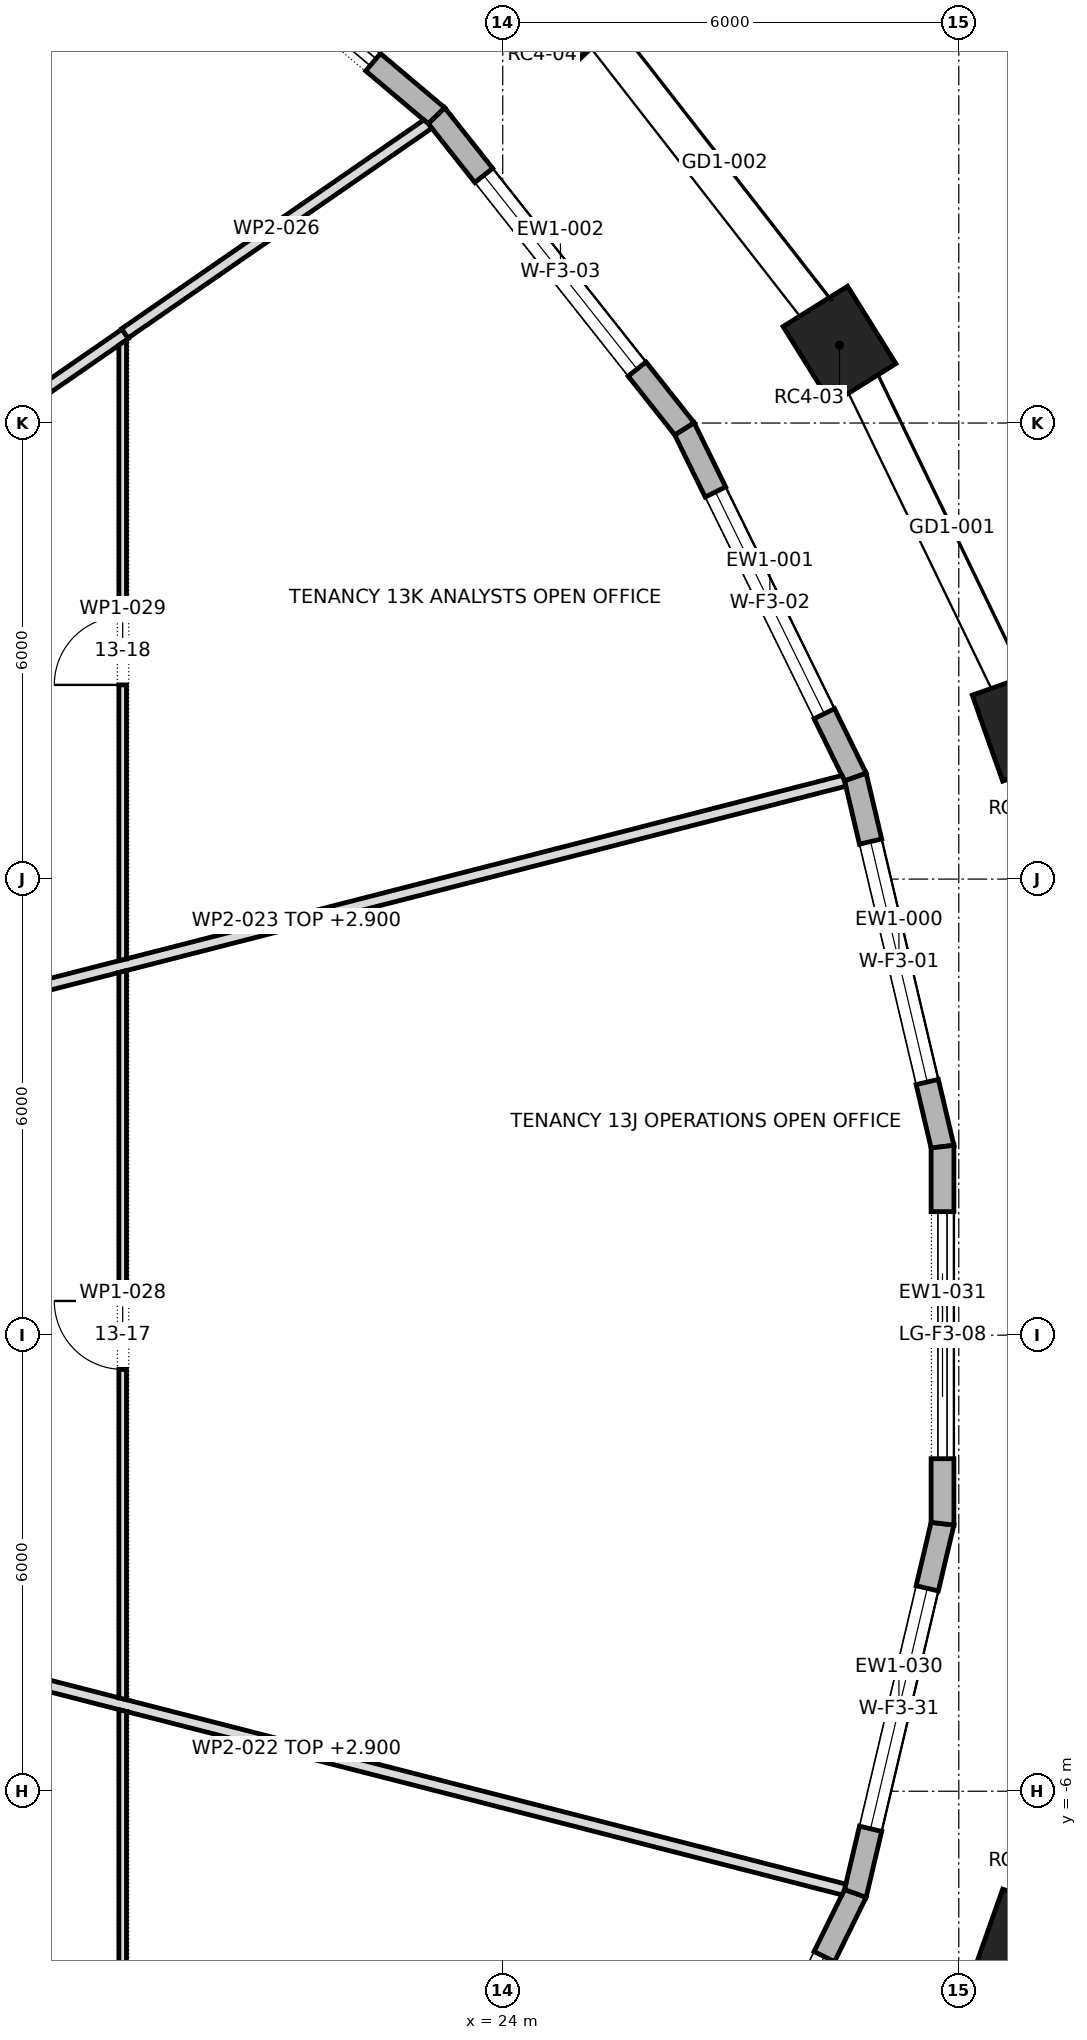
"""IFC4 building model, lengths in metres.
Left out: names, types, materials, properties, quantities, classifications, styles, units other than length and angle.
Written with IfcOpenShell. Run it as: python <this file> out.ifc"""

import sys

from ifc_helpers import new_model, si_unit, direction, frame, frame_2d, origin, origin_2d, place, context, subcontext, project, spatial, polyline, rectangle, outline, extrude, element, fill, save


model = new_model("IFC4")
c1 = context("Model", 3, precision=1e-05, world=origin(), true_north=direction((0.0, 1.0)))
c2 = subcontext(c1, "Body", "Model", "MODEL_VIEW")
j1 = project(units=[si_unit("LENGTHUNIT", "METRE"), si_unit("PLANEANGLEUNIT", "RADIAN")], contexts=[c1])
p1 = place(None, origin())
s1 = spatial("IfcSite", under=j1, at=p1, CompositionType="ELEMENT")
p2 = place(p1, origin())
s2 = spatial("IfcBuilding", under=s1, at=p2, CompositionType="ELEMENT")
p3 = place(p2, frame((0.0, 0.0, 198.9)))
s3 = spatial("IfcBuildingStorey", under=s2, at=p3, CompositionType="ELEMENT", Elevation=198.9)
for number, where, z_axis, x_axis in (
    (1, (30.849, 8.021, 0.0), (0.0, 0.0, 1.0), (-0.334, 0.943, 0.0)),
    (2, (28.43, 13.025, 0.0), (0.0, 0.0, 1.0), (-0.529, 0.849, 0.0)),
    (3, (24.919, 17.529, 0.0), (0.0, 0.0, 1.0), (-0.692, 0.722, 0.0)),
    (4, (30.849, -8.021, 0.0), (0.0, 0.0, 1.0), (0.334, 0.943, 0.0)),
):
    element("IfcColumn", number, at=place(p3, frame(where, z_axis=z_axis, x_axis=x_axis)), inside=s3, PredefinedType="COLUMN", context=c2, shape_type="SweptSolid", body=[
        extrude(rectangle(XDim=1.2, YDim=1.0, at=origin_2d()), origin(), (0.0, 0.0, 1.0), 4.0),
    ])
p4 = place(p3, frame((29.785, 2.48, 0.0), z_axis=(0.0, 0.0, 1.0), x_axis=(-0.229455912692, 0.97331905567, 0.0)))
e5 = element("IfcWall", 5, at=p4, inside=s3, PredefinedType="STANDARD", context=c2, shape_type="SweptSolid", body=[
    extrude(outline(polyline([(-0.017, -0.15), (5.014, -0.15), (4.981, 0.15), (0.017, 0.15), (-0.017, -0.15)])), origin(), (0.0, 0.0, 1.0), 3.7),
])
p5 = place(p4, frame((0.874, 0.0, 0.6)))
e6 = element("IfcOpeningElement", 6, at=p5, cuts=e5, PredefinedType="OPENING", context=c2, shape_type="SweptSolid", body=[
    extrude(rectangle(XDim=3.25, YDim=2.65, at=frame_2d((1.625, 1.325))), frame((0.0, 0.162, 0.0), z_axis=(0.0, -1.0, 0.0), x_axis=(1.0, 0.0, 0.0)), (0.0, 0.0, 1.0), 0.324),
])
p6 = place(p3, frame((28.639, 7.344, 0.0), z_axis=(0.0, 0.0, 1.0), x_axis=(-0.440694221881, 0.897657285829, 0.0)))
e7 = element("IfcWall", 7, at=p6, inside=s3, PredefinedType="STANDARD", context=c2, shape_type="SweptSolid", body=[
    extrude(outline(polyline([(-0.017, -0.15), (5.118, -0.15), (5.086, 0.15), (0.017, 0.15), (-0.017, -0.15)])), origin(), (0.0, 0.0, 1.0), 3.7),
])
p7 = place(p6, frame((0.926, 0.0, 0.6)))
e8 = element("IfcOpeningElement", 8, at=p7, cuts=e7, PredefinedType="OPENING", context=c2, shape_type="SweptSolid", body=[
    extrude(rectangle(XDim=3.25, YDim=2.65, at=frame_2d((1.625, 1.325))), frame((0.0, 0.162, 0.0), z_axis=(0.0, -1.0, 0.0), x_axis=(1.0, 0.0, 0.0)), (0.0, 0.0, 1.0), 0.324),
])
p8 = place(p3, frame((26.39, 11.924, 0.0), z_axis=(0.0, 0.0, 1.0), x_axis=(-0.620829074232, 0.783945955145, 0.0)))
e9 = element("IfcWall", 9, at=p8, inside=s3, PredefinedType="STANDARD", context=c2, shape_type="SweptSolid", body=[
    extrude(outline(polyline([(-0.016, -0.15), (5.27, -0.15), (5.24, 0.15), (0.016, 0.15), (-0.016, -0.15)])), origin(), (0.0, 0.0, 1.0), 3.7),
])
p9 = place(p8, frame((1.003, 0.0, 0.6)))
e10 = element("IfcOpeningElement", 10, at=p9, cuts=e9, PredefinedType="OPENING", context=c2, shape_type="SweptSolid", body=[
    extrude(rectangle(XDim=3.25, YDim=2.65, at=frame_2d((1.625, 1.325))), frame((0.0, 0.162, 0.0), z_axis=(0.0, -1.0, 0.0), x_axis=(1.0, 0.0, 0.0)), (0.0, 0.0, 1.0), 0.324),
])
p10 = place(p3, frame((23.128, 16.044, 0.0), z_axis=(0.0, 0.0, 1.0), x_axis=(-0.764330261608, 0.644824977176, 0.0)))
e11 = element("IfcWall", 11, at=p10, inside=s3, PredefinedType="STANDARD", context=c2, shape_type="SweptSolid", body=[
    extrude(outline(polyline([(-0.015, -0.15), (5.444, -0.15), (5.416, 0.15), (0.015, 0.15), (-0.015, -0.15)])), origin(), (0.0, 0.0, 1.0), 3.7),
])
p11 = place(p10, frame((1.09, 0.0, 0.0)))
e12 = element("IfcOpeningElement", 12, at=p11, cuts=e11, PredefinedType="OPENING", context=c2, shape_type="SweptSolid", body=[
    extrude(rectangle(XDim=3.25, YDim=3.25, at=frame_2d((1.625, 1.625))), frame((0.0, 0.162, 0.0), z_axis=(0.0, -1.0, 0.0), x_axis=(1.0, 0.0, 0.0)), (0.0, 0.0, 1.0), 0.324),
])
p12 = place(p3, frame((26.39, -11.924, 0.0), z_axis=(0.0, 0.0, 1.0), x_axis=(0.440694221881, 0.897657285829, 0.0)))
e13 = element("IfcWall", 13, at=p12, inside=s3, PredefinedType="STANDARD", context=c2, shape_type="SweptSolid", body=[
    extrude(outline(polyline([(-0.016, -0.15), (5.119, -0.15), (5.085, 0.15), (0.016, 0.15), (-0.016, -0.15)])), origin(), (0.0, 0.0, 1.0), 3.7),
])
p13 = place(p12, frame((0.926, 0.0, 0.6)))
e14 = element("IfcOpeningElement", 14, at=p13, cuts=e13, PredefinedType="OPENING", context=c2, shape_type="SweptSolid", body=[
    extrude(rectangle(XDim=3.25, YDim=2.65, at=frame_2d((1.625, 1.325))), frame((0.0, 0.162, 0.0), z_axis=(0.0, -1.0, 0.0), x_axis=(1.0, 0.0, 0.0)), (0.0, 0.0, 1.0), 0.324),
])
p14 = place(p3, frame((28.639, -7.344, 0.0), z_axis=(0.0, 0.0, 1.0), x_axis=(0.229455912692, 0.97331905567, 0.0)))
e15 = element("IfcWall", 15, at=p14, inside=s3, PredefinedType="STANDARD", context=c2, shape_type="SweptSolid", body=[
    extrude(outline(polyline([(-0.017, -0.15), (5.015, -0.15), (4.98, 0.15), (0.017, 0.15), (-0.017, -0.15)])), origin(), (0.0, 0.0, 1.0), 3.7),
])
p15 = place(p14, frame((0.874, 0.0, 0.6)))
e16 = element("IfcOpeningElement", 16, at=p15, cuts=e15, PredefinedType="OPENING", context=c2, shape_type="SweptSolid", body=[
    extrude(rectangle(XDim=3.25, YDim=2.65, at=frame_2d((1.625, 1.325))), frame((0.0, 0.162, 0.0), z_axis=(0.0, -1.0, 0.0), x_axis=(1.0, 0.0, 0.0)), (0.0, 0.0, 1.0), 0.324),
])
p16 = place(p3, frame((29.785, -2.48, 0.0), z_axis=(0.0, 0.0, 1.0), x_axis=(0.0, 1.0, 0.0)))
e17 = element("IfcWall", 17, at=p16, inside=s3, PredefinedType="STANDARD", context=c2, shape_type="SweptSolid", body=[
    extrude(outline(polyline([(-0.017, -0.15), (4.977, -0.15), (4.943, 0.15), (0.017, 0.15), (-0.017, -0.15)])), origin(), (0.0, 0.0, 1.0), 3.7),
])
p17 = place(p16, frame((0.855, 0.0, 0.0)))
e18 = element("IfcOpeningElement", 18, at=p17, cuts=e17, PredefinedType="OPENING", context=c2, shape_type="SweptSolid", body=[
    extrude(rectangle(XDim=3.25, YDim=3.25, at=frame_2d((1.625, 1.625))), frame((0.0, 0.162, 0.0), z_axis=(0.0, -1.0, 0.0), x_axis=(1.0, 0.0, 0.0)), (0.0, 0.0, 1.0), 0.324),
])
p18 = place(p3, frame((13.598, 13.977, 0.0), z_axis=(0.0, 0.0, 1.0), x_axis=(0.696864554069, 0.717202756048, 0.0)))
e19 = element("IfcWall", 19, at=p18, inside=s3, PredefinedType="PARTITIONING", context=c2, shape_type="SweptSolid", body=[
    extrude(outline(polyline([(7.599, -0.075), (7.599, -0.074), (7.594, -0.003), (7.573, 0.075), (5.696, 0.075), (3.818, 0.075), (1.941, 0.075), (0.063, 0.075), (0.032, 0.0), (0.0, -0.075), (1.9, -0.075), (3.799, -0.075), (5.699, -0.075), (7.599, -0.075)])), origin(), (0.0, 0.0, 1.0), 3.7),
])
p19 = place(p3, frame((14.057, -3.594, 0.0), z_axis=(0.0, 0.0, 1.0), x_axis=(0.96870063855, -0.248231893342, 0.0)))
e20 = element("IfcWall", 20, at=p19, inside=s3, PredefinedType="PARTITIONING", context=c2, shape_type="SweptSolid", body=[
    extrude(outline(polyline([(0.038, -0.075), (1.748, -0.075), (3.458, -0.075), (5.168, -0.075), (5.174, -0.073), (5.174, -0.075), (7.117, -0.075), (9.061, -0.075), (11.004, -0.075), (12.947, -0.075), (14.89, -0.075), (14.904, -0.008), (14.904, 0.075), (12.931, 0.075), (10.958, 0.075), (8.985, 0.075), (7.011, 0.075), (5.038, 0.075), (5.033, 0.073), (5.032, 0.075), (3.355, 0.075), (1.677, 0.075), (0.0, 0.075), (0.0, 0.074), (0.038, -0.075)])), origin(), (0.0, 0.0, 1.0), 2.9),
])
p20 = place(p3, frame((14.057, 3.594, 0.0), z_axis=(0.0, 0.0, 1.0), x_axis=(0.96870063855, 0.248231893342, 0.0)))
e21 = element("IfcWall", 21, at=p20, inside=s3, PredefinedType="PARTITIONING", context=c2, shape_type="SweptSolid", body=[
    extrude(outline(polyline([(0.0, -0.075), (1.677, -0.075), (3.355, -0.075), (5.032, -0.075), (5.033, -0.073), (5.038, -0.075), (7.011, -0.075), (8.985, -0.075), (10.958, -0.075), (12.931, -0.075), (14.904, -0.075), (14.904, 0.008), (14.89, 0.075), (12.947, 0.075), (11.004, 0.075), (9.061, 0.075), (7.117, 0.075), (5.174, 0.075), (5.174, 0.073), (5.168, 0.075), (3.458, 0.075), (1.748, 0.075), (0.038, 0.075), (0.0, -0.074), (0.0, -0.075)])), origin(), (0.0, 0.0, 1.0), 2.9),
])
p21 = place(p3, frame((13.968, 9.667, 0.0), z_axis=(0.0, 0.0, 1.0), x_axis=(0.822290630684, 0.569067762827, 0.0)))
e22 = element("IfcWall", 22, at=p21, inside=s3, PredefinedType="PARTITIONING", context=c2, shape_type="SweptSolid", body=[
    extrude(outline(polyline([(6.16, 0.075), (4.62, 0.075), (3.08, 0.075), (1.54, 0.075), (0.0, 0.075), (0.079, -0.075), (1.599, -0.075), (3.119, -0.075), (4.64, -0.075), (6.16, -0.075), (6.16, 0.075)])), origin(), (0.0, 0.0, 1.0), 2.947),
])
p22 = place(p3, frame((19.028, 13.179, 0.0), z_axis=(0.0, 0.0, 1.0), x_axis=(0.822732902653, 0.568428158074, 0.0)))
e23 = element("IfcWall", 23, at=p22, inside=s3, PredefinedType="PARTITIONING", context=c2, shape_type="SweptSolid", body=[
    extrude(outline(polyline([(4.857, -0.075), (4.857, -0.068), (4.852, 0.002), (4.832, 0.075), (3.221, 0.075), (1.611, 0.075), (0.0, 0.075), (0.0, -0.04), (0.0, -0.075), (1.619, -0.075), (3.238, -0.075), (4.857, -0.075)])), origin(), (0.0, 0.0, 1.0), 3.7),
])
p23 = place(p3, frame((19.0, -4.926, 0.0), z_axis=(0.0, 0.0, 1.0), x_axis=(0.0, -1.0, 0.0)))
e24 = element("IfcWall", 24, at=p23, inside=s3, PredefinedType="PARTITIONING", context=c2, shape_type="SweptSolid", body=[
    extrude(outline(polyline([(0.0, -0.05), (1.62, -0.05), (3.24, -0.05), (4.86, -0.05), (6.481, -0.05), (8.101, -0.05), (8.169, 0.049), (8.169, 0.05), (6.541, 0.05), (4.912, 0.05), (3.283, 0.05), (1.654, 0.05), (0.025, 0.05), (0.0, -0.049), (0.0, -0.05)])), origin(), (0.0, 0.0, 1.0), 3.7),
])
p24 = place(p23, frame((3.629, 0.0, 0.0)))
e25 = element("IfcOpeningElement", 25, at=p24, cuts=e24, PredefinedType="OPENING", context=c2, shape_type="SweptSolid", body=[
    extrude(rectangle(XDim=0.9, YDim=2.1, at=frame_2d((0.45, 1.05))), frame((0.0, 0.062, 0.0), z_axis=(0.0, -1.0, 0.0), x_axis=(1.0, 0.0, 0.0)), (0.0, 0.0, 1.0), 0.124),
])
p25 = place(p3, frame((19.0, 4.796, 0.0), z_axis=(0.0, 0.0, 1.0), x_axis=(0.0, -1.0, 0.0)))
e26 = element("IfcWall", 26, at=p25, inside=s3, PredefinedType="PARTITIONING", context=c2, shape_type="SweptSolid", body=[
    extrude(outline(polyline([(0.025, -0.05), (1.934, -0.05), (3.842, -0.05), (5.75, -0.05), (7.659, -0.05), (9.567, -0.05), (9.593, 0.049), (9.593, 0.05), (7.674, 0.05), (5.756, 0.05), (3.837, 0.05), (1.918, 0.05), (0.0, 0.05), (0.0, 0.049), (0.025, -0.05)])), origin(), (0.0, 0.0, 1.0), 3.7),
])
p26 = place(p25, frame((4.346, 0.0, 0.0)))
e27 = element("IfcOpeningElement", 27, at=p26, cuts=e26, PredefinedType="OPENING", context=c2, shape_type="SweptSolid", body=[
    extrude(rectangle(XDim=0.9, YDim=2.1, at=frame_2d((0.45, 1.05))), frame((0.0, 0.062, 0.0), z_axis=(0.0, -1.0, 0.0), x_axis=(1.0, 0.0, 0.0)), (0.0, 0.0, 1.0), 0.124),
])
p27 = place(p3, frame((19.0, 13.093, 0.0), z_axis=(0.0, 0.0, 1.0), x_axis=(0.0, -1.0, 0.0)))
e28 = element("IfcWall", 28, at=p27, inside=s3, PredefinedType="PARTITIONING", context=c2, shape_type="SweptSolid", body=[
    extrude(outline(polyline([(8.167, -0.05), (8.167, -0.049), (8.142, 0.05), (6.513, 0.05), (4.885, 0.05), (3.257, 0.05), (1.628, 0.05), (0.0, 0.05), (0.0, 0.05), (0.069, -0.05), (1.688, -0.05), (3.308, -0.05), (4.928, -0.05), (6.547, -0.05), (8.167, -0.05)])), origin(), (0.0, 0.0, 1.0), 3.7),
])
p28 = place(p27, frame((3.638, 0.0, 0.0)))
e29 = element("IfcOpeningElement", 29, at=p28, cuts=e28, PredefinedType="OPENING", context=c2, shape_type="SweptSolid", body=[
    extrude(rectangle(XDim=0.9, YDim=2.1, at=frame_2d((0.45, 1.05))), frame((0.0, 0.062, 0.0), z_axis=(0.0, -1.0, 0.0), x_axis=(1.0, 0.0, 0.0)), (0.0, 0.0, 1.0), 0.124),
])
p29 = place(p5, origin())
e30 = element("IfcWindow", 30, at=p29, inside=s3, PartitioningType="TRIPLE_PANEL_VERTICAL", PredefinedType="WINDOW", context=c2, shape_type="SweptSolid", body=[
    extrude(rectangle(XDim=3.25, YDim=2.65, at=frame_2d((1.625, 1.325))), frame((0.0, 0.03, 0.0), z_axis=(0.0, -1.0, 0.0), x_axis=(1.0, 0.0, 0.0)), (0.0, 0.0, 1.0), 0.06),
])
fill(e6, e30)
p30 = place(p7, origin())
e31 = element("IfcWindow", 31, at=p30, inside=s3, PartitioningType="TRIPLE_PANEL_VERTICAL", PredefinedType="WINDOW", context=c2, shape_type="SweptSolid", body=[
    extrude(rectangle(XDim=3.25, YDim=2.65, at=frame_2d((1.625, 1.325))), frame((0.0, 0.03, 0.0), z_axis=(0.0, -1.0, 0.0), x_axis=(1.0, 0.0, 0.0)), (0.0, 0.0, 1.0), 0.06),
])
fill(e8, e31)
p31 = place(p9, origin())
e32 = element("IfcWindow", 32, at=p31, inside=s3, PartitioningType="TRIPLE_PANEL_VERTICAL", PredefinedType="WINDOW", context=c2, shape_type="SweptSolid", body=[
    extrude(rectangle(XDim=3.25, YDim=2.65, at=frame_2d((1.625, 1.325))), frame((0.0, 0.03, 0.0), z_axis=(0.0, -1.0, 0.0), x_axis=(1.0, 0.0, 0.0)), (0.0, 0.0, 1.0), 0.06),
])
fill(e10, e32)
p32 = place(p11, origin())
e33 = element("IfcDoor", 33, at=p32, inside=s3, OperationType="DOUBLE_DOOR_SLIDING", PredefinedType="DOOR", context=c2, shape_type="SweptSolid", body=[
    extrude(rectangle(XDim=3.25, YDim=3.25, at=frame_2d((1.625, 1.625))), frame((0.0, 0.025, 0.0), z_axis=(0.0, -1.0, 0.0), x_axis=(1.0, 0.0, 0.0)), (0.0, 0.0, 1.0), 0.05),
])
fill(e12, e33)
p33 = place(p13, origin())
e34 = element("IfcWindow", 34, at=p33, inside=s3, PartitioningType="TRIPLE_PANEL_VERTICAL", PredefinedType="WINDOW", context=c2, shape_type="SweptSolid", body=[
    extrude(rectangle(XDim=3.25, YDim=2.65, at=frame_2d((1.625, 1.325))), frame((0.0, 0.03, 0.0), z_axis=(0.0, -1.0, 0.0), x_axis=(1.0, 0.0, 0.0)), (0.0, 0.0, 1.0), 0.06),
])
fill(e14, e34)
p34 = place(p15, origin())
e35 = element("IfcWindow", 35, at=p34, inside=s3, PartitioningType="TRIPLE_PANEL_VERTICAL", PredefinedType="WINDOW", context=c2, shape_type="SweptSolid", body=[
    extrude(rectangle(XDim=3.25, YDim=2.65, at=frame_2d((1.625, 1.325))), frame((0.0, 0.03, 0.0), z_axis=(0.0, -1.0, 0.0), x_axis=(1.0, 0.0, 0.0)), (0.0, 0.0, 1.0), 0.06),
])
fill(e16, e35)
p35 = place(p17, origin())
e36 = element("IfcDoor", 36, at=p35, inside=s3, OperationType="DOUBLE_DOOR_SLIDING", PredefinedType="DOOR", context=c2, shape_type="SweptSolid", body=[
    extrude(rectangle(XDim=3.25, YDim=3.25, at=frame_2d((1.625, 1.625))), frame((0.0, 0.025, 0.0), z_axis=(0.0, -1.0, 0.0), x_axis=(1.0, 0.0, 0.0)), (0.0, 0.0, 1.0), 0.05),
])
fill(e18, e36)
p36 = place(p26, frame((0.9, 0.0, 0.0), z_axis=(0.0, 0.0, 1.0), x_axis=(-1.0, 0.0, 0.0)))
e37 = element("IfcDoor", 37, at=p36, inside=s3, OperationType="SINGLE_SWING_LEFT", PredefinedType="DOOR", context=c2, shape_type="SweptSolid", body=[
    extrude(rectangle(XDim=0.9, YDim=2.1, at=frame_2d((0.45, 1.05))), frame((0.0, 0.025, 0.0), z_axis=(0.0, -1.0, 0.0), x_axis=(1.0, 0.0, 0.0)), (0.0, 0.0, 1.0), 0.05),
])
fill(e27, e37)
p37 = place(p28, frame((0.9, 0.0, 0.0), z_axis=(0.0, 0.0, 1.0), x_axis=(-1.0, 0.0, 0.0)))
e38 = element("IfcDoor", 38, at=p37, inside=s3, OperationType="SINGLE_SWING_RIGHT", PredefinedType="DOOR", context=c2, shape_type="SweptSolid", body=[
    extrude(rectangle(XDim=0.9, YDim=2.1, at=frame_2d((0.45, 1.05))), frame((0.0, 0.025, 0.0), z_axis=(0.0, -1.0, 0.0), x_axis=(1.0, 0.0, 0.0)), (0.0, 0.0, 1.0), 0.05),
])
fill(e29, e38)
save(model, sys.argv[1])
